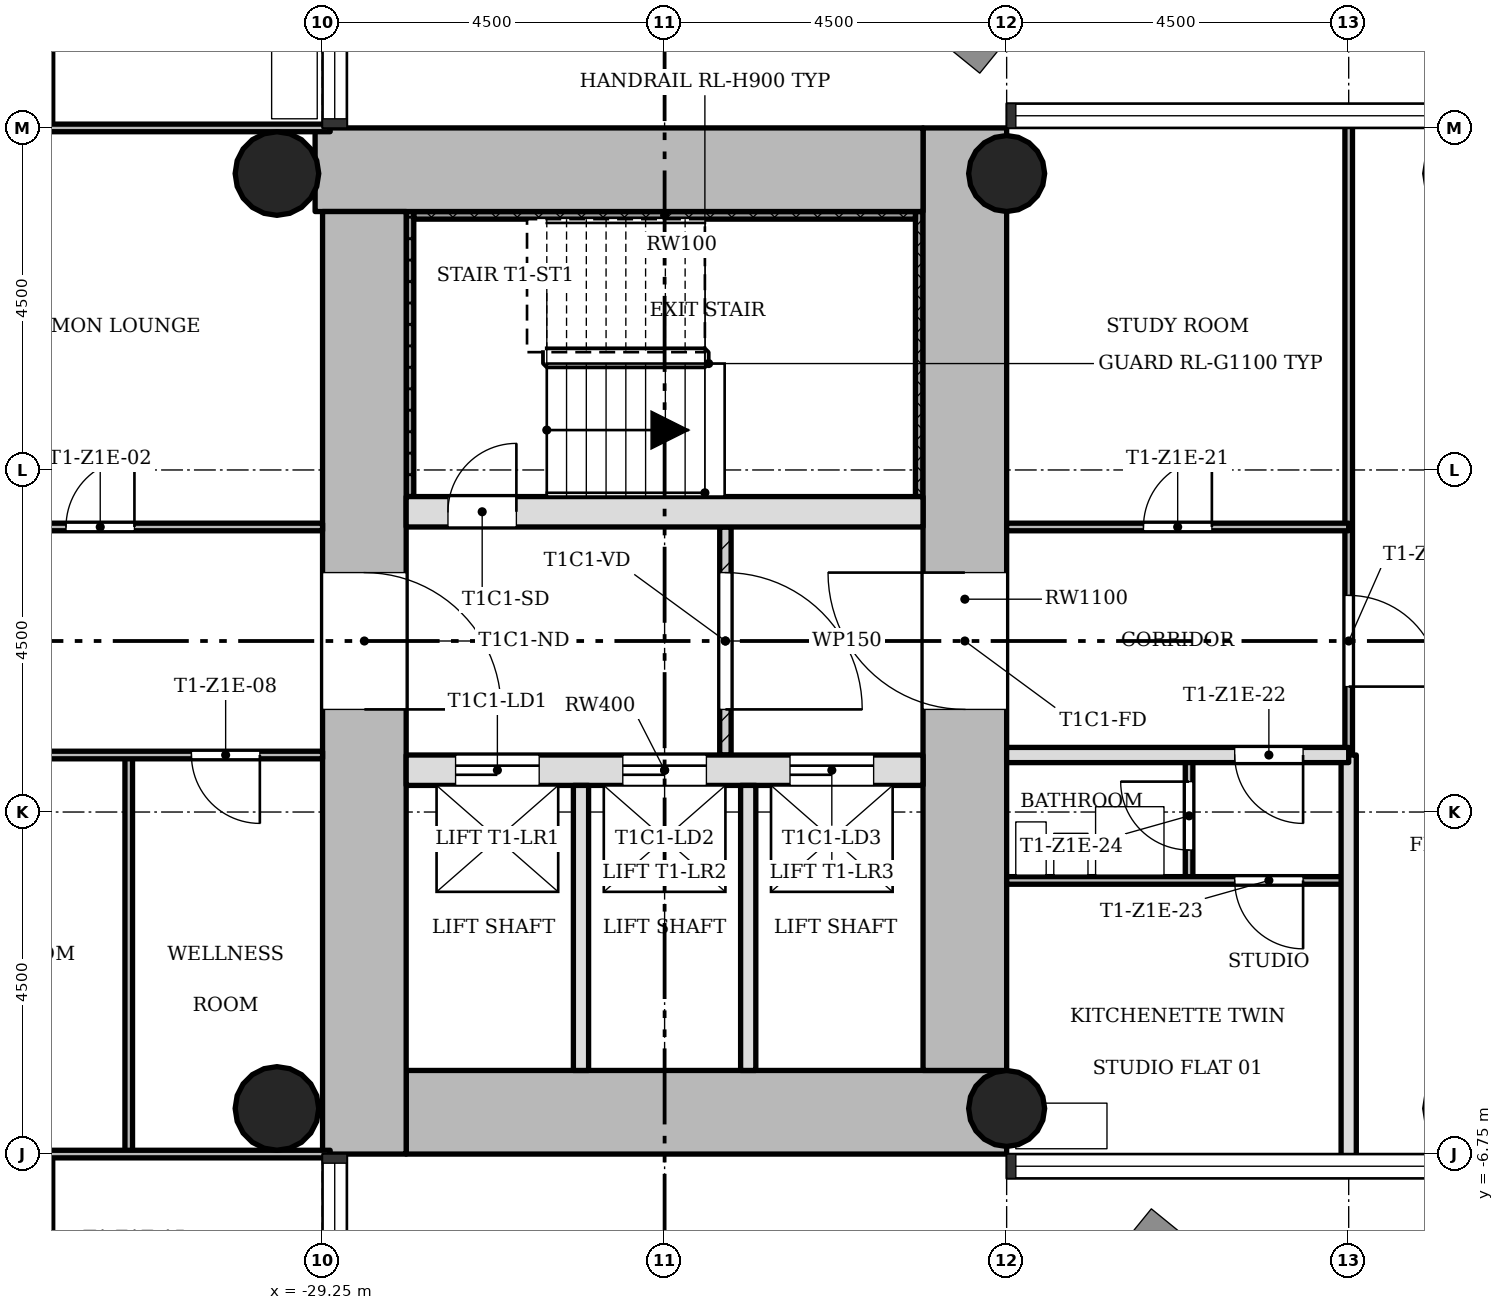
"""IFC4 building model, lengths in metres.
Left out: names, types, materials, properties, quantities, classifications, styles, units other than length and angle.
Written with IfcOpenShell. Run it as: python <this file> out.ifc"""

import sys

from ifc_helpers import new_model, si_unit, direction, frame, frame_2d, origin, origin_2d, place, context, subcontext, project, spatial, rectangle, hollow_circle, extrude, element, fill, save


model = new_model("IFC4")
c1 = context("Model", 3, precision=1e-05, world=origin(), true_north=direction((0.0, 1.0)))
c2 = subcontext(c1, "Body", "Model", "MODEL_VIEW")
j1 = project(units=[si_unit("LENGTHUNIT", "METRE"), si_unit("PLANEANGLEUNIT", "RADIAN")], contexts=[c1])
p1 = place(None, origin())
s1 = spatial("IfcSite", under=j1, at=p1, CompositionType="ELEMENT")
p2 = place(p1, origin())
s2 = spatial("IfcBuilding", under=s1, at=p2, CompositionType="ELEMENT")
p3 = place(p2, frame((0.0, 0.0, 65.3)))
s3 = spatial("IfcBuildingStorey", under=s2, at=p3, CompositionType="ELEMENT", Elevation=65.3)
p4 = place(p3, frame((-28.15, -6.2, 0.0), z_axis=(0.0, 0.0, 1.0), x_axis=(1.0, 0.0, 0.0)))
e1 = element("IfcWall", 1, at=p4, inside=s3, PredefinedType="SHEAR", context=c2, shape_type="SweptSolid", body=[
    extrude(rectangle(XDim=7.9, YDim=1.1, at=frame_2d((3.95, 0.0))), origin(), (0.0, 0.0, 1.0), 3.4),
])
p5 = place(p3, frame((-20.8, -5.65, 0.0), z_axis=(0.0, 0.0, 1.0), x_axis=(0.0, 1.0, 0.0)))
e2 = element("IfcWall", 2, at=p5, inside=s3, PredefinedType="SHEAR", context=c2, shape_type="SweptSolid", body=[
    extrude(rectangle(XDim=12.4, YDim=1.1, at=frame_2d((6.2, 0.0))), origin(), (0.0, 0.0, 1.0), 3.4),
])
p6 = place(p5, frame((4.75, 0.0, 0.0)))
e3 = element("IfcOpeningElement", 3, at=p6, cuts=e2, PredefinedType="OPENING", context=c2, shape_type="SweptSolid", body=[
    extrude(rectangle(XDim=1.8, YDim=2.1, at=frame_2d((0.9, 1.05))), frame((0.0, 0.56, 0.0), z_axis=(0.0, -1.0, 0.0), x_axis=(1.0, 0.0, 0.0)), (0.0, 0.0, 1.0), 1.12),
])
p7 = place(p3, frame((-21.35, 6.2, 0.0), z_axis=(0.0, 0.0, 1.0), x_axis=(-1.0, 0.0, 0.0)))
e4 = element("IfcWall", 4, at=p7, inside=s3, PredefinedType="SHEAR", context=c2, shape_type="SweptSolid", body=[
    extrude(rectangle(XDim=7.998, YDim=1.1, at=frame_2d((3.999, 0.0))), origin(), (0.0, 0.0, 1.0), 3.4),
])
p8 = place(p3, frame((-28.7, 5.65, 0.0), z_axis=(0.0, 0.0, 1.0), x_axis=(0.0, -1.0, 0.0)))
e5 = element("IfcWall", 5, at=p8, inside=s3, PredefinedType="SHEAR", context=c2, shape_type="SweptSolid", body=[
    extrude(rectangle(XDim=12.4, YDim=1.1, at=frame_2d((6.2, 0.0))), origin(), (0.0, 0.0, 1.0), 3.4),
])
p9 = place(p8, frame((4.75, 0.0, 0.0)))
e6 = element("IfcOpeningElement", 6, at=p9, cuts=e5, PredefinedType="OPENING", context=c2, shape_type="SweptSolid", body=[
    extrude(rectangle(XDim=1.8, YDim=2.1, at=frame_2d((0.9, 1.05))), frame((0.0, 0.56, 0.0), z_axis=(0.0, -1.0, 0.0), x_axis=(1.0, 0.0, 0.0)), (0.0, 0.0, 1.0), 1.12),
])
p10 = place(p3, frame((-28.15, -1.7, 0.0), z_axis=(0.0, 0.0, 1.0), x_axis=(1.0, 0.0, 0.0)))
e7 = element("IfcWall", 7, at=p10, inside=s3, PredefinedType="SHEAR", context=c2, shape_type="SweptSolid", body=[
    extrude(rectangle(XDim=6.8, YDim=0.4, at=frame_2d((3.4, 0.0))), origin(), (0.0, 0.0, 1.0), 3.4),
])
p11 = place(p10, frame((0.65, 0.0, 0.0)))
e8 = element("IfcOpeningElement", 8, at=p11, cuts=e7, PredefinedType="OPENING", context=c2, shape_type="SweptSolid", body=[
    extrude(rectangle(XDim=1.1, YDim=2.1, at=frame_2d((0.55, 1.05))), frame((0.0, 0.21, 0.0), z_axis=(0.0, -1.0, 0.0), x_axis=(1.0, 0.0, 0.0)), (0.0, 0.0, 1.0), 0.42),
])
p12 = place(p10, frame((2.85, 0.0, 0.0)))
e9 = element("IfcOpeningElement", 9, at=p12, cuts=e7, PredefinedType="OPENING", context=c2, shape_type="SweptSolid", body=[
    extrude(rectangle(XDim=1.1, YDim=2.1, at=frame_2d((0.55, 1.05))), frame((0.0, 0.21, 0.0), z_axis=(0.0, -1.0, 0.0), x_axis=(1.0, 0.0, 0.0)), (0.0, 0.0, 1.0), 0.42),
])
p13 = place(p10, frame((5.05, 0.0, 0.0)))
e10 = element("IfcOpeningElement", 10, at=p13, cuts=e7, PredefinedType="OPENING", context=c2, shape_type="SweptSolid", body=[
    extrude(rectangle(XDim=1.1, YDim=2.1, at=frame_2d((0.55, 1.05))), frame((0.0, 0.21, 0.0), z_axis=(0.0, -1.0, 0.0), x_axis=(1.0, 0.0, 0.0)), (0.0, 0.0, 1.0), 0.42),
])
p14 = place(p3, frame((-28.15, 1.7, 0.0), z_axis=(0.0, 0.0, 1.0), x_axis=(1.0, 0.0, 0.0)))
e11 = element("IfcWall", 11, at=p14, inside=s3, PredefinedType="SHEAR", context=c2, shape_type="SweptSolid", body=[
    extrude(rectangle(XDim=6.8, YDim=0.4, at=frame_2d((3.4, 0.0))), origin(), (0.0, 0.0, 1.0), 3.4),
])
p15 = place(p14, frame((0.55, 0.0, 0.0)))
e12 = element("IfcOpeningElement", 12, at=p15, cuts=e11, PredefinedType="OPENING", context=c2, shape_type="SweptSolid", body=[
    extrude(rectangle(XDim=0.9, YDim=2.1, at=frame_2d((0.45, 1.05))), frame((0.0, 0.21, 0.0), z_axis=(0.0, -1.0, 0.0), x_axis=(1.0, 0.0, 0.0)), (0.0, 0.0, 1.0), 0.42),
])
for number, where, z_axis, x_axis in (
    (13, (-20.25, -6.15, 0.0), (0.0, 0.0, 1.0), (1.0, 0.0, 0.0)),
    (14, (-20.25, 6.15, 0.0), (0.0, 0.0, 1.0), (1.0, 0.0, 0.0)),
):
    element("IfcColumn", number, at=place(p3, frame(where, z_axis=z_axis, x_axis=x_axis)), inside=s3, PredefinedType="COLUMN", context=c2, shape_type="SweptSolid", body=[
        extrude(hollow_circle(Radius=0.5, WallThickness=0.036, at=origin_2d()), origin(), (0.0, 0.0, 1.0), 3.4),
    ])
for number, where, z_axis, x_axis in (
    (15, (-29.85, -6.15, 0.0), (0.0, 0.0, 1.0), (1.0, 0.0, 0.0)),
    (16, (-29.85, 6.15, 0.0), (0.0, 0.0, 1.0), (1.0, 0.0, 0.0)),
):
    element("IfcColumn", number, at=place(p3, frame(where, z_axis=z_axis, x_axis=x_axis)), inside=s3, PredefinedType="COLUMN", context=c2, shape_type="SweptSolid", body=[
        extrude(hollow_circle(Radius=0.55, WallThickness=0.04, at=origin_2d()), origin(), (0.0, 0.0, 1.0), 3.4),
    ])
p16 = place(p3, frame((-23.95, -1.5, 0.0), z_axis=(0.0, 0.0, 1.0), x_axis=(0.0, 1.0, 0.0)))
e17 = element("IfcWall", 17, at=p16, inside=s3, PredefinedType="PARTITIONING", context=c2, shape_type="SweptSolid", body=[
    extrude(rectangle(XDim=3.0, YDim=0.15, at=frame_2d((1.5, 0.0))), origin(), (0.0, 0.0, 1.0), 3.0),
])
p17 = place(p16, frame((0.6, 0.0, 0.0)))
e18 = element("IfcOpeningElement", 18, at=p17, cuts=e17, PredefinedType="OPENING", context=c2, shape_type="SweptSolid", body=[
    extrude(rectangle(XDim=1.8, YDim=2.1, at=frame_2d((0.9, 1.05))), frame((0.0, 0.085, 0.0), z_axis=(0.0, -1.0, 0.0), x_axis=(1.0, 0.0, 0.0)), (0.0, 0.0, 1.0), 0.17),
])
for number, where, z_axis, x_axis in (
    (19, (-25.85, -5.65, 0.0), (0.0, 0.0, 1.0), (0.0, 1.0, 0.0)),
    (20, (-23.65, -5.65, 0.0), (0.0, 0.0, 1.0), (0.0, 1.0, 0.0)),
):
    element("IfcWall", number, at=place(p3, frame(where, z_axis=z_axis, x_axis=x_axis)), inside=s3, PredefinedType="SOLIDWALL", context=c2, shape_type="SweptSolid", body=[
        extrude(rectangle(XDim=3.75, YDim=0.2, at=frame_2d((1.875, 0.0))), origin(), (0.0, 0.0, 1.0), 3.0),
    ])
p18 = place(p3, frame((-31.8, -6.75, 0.0), z_axis=(0.0, 0.0, 1.0), x_axis=(0.0, 1.0, 0.0)))
e21 = element("IfcWall", 21, at=p18, inside=s3, PredefinedType="PARTITIONING", context=c2, shape_type="SweptSolid", body=[
    extrude(rectangle(XDim=5.25, YDim=0.1, at=frame_2d((2.625, 0.0))), origin(), (0.0, 0.0, 1.0), 3.0),
])
p19 = place(p3, frame((-17.85, -3.15, 0.0), z_axis=(0.0, 0.0, 1.0), x_axis=(0.0, 1.0, 0.0)))
e22 = element("IfcWall", 22, at=p19, inside=s3, PredefinedType="PARTITIONING", context=c2, shape_type="SweptSolid", body=[
    extrude(rectangle(XDim=1.65, YDim=0.1, at=frame_2d((0.825, 0.0))), origin(), (0.0, 0.0, 1.0), 3.0),
])
p20 = place(p19, frame((0.4, 0.0, 0.0)))
e23 = element("IfcOpeningElement", 23, at=p20, cuts=e22, PredefinedType="OPENING", context=c2, shape_type="SweptSolid", body=[
    extrude(rectangle(XDim=0.9, YDim=2.1, at=frame_2d((0.45, 1.05))), frame((0.0, 0.06, 0.0), z_axis=(0.0, -1.0, 0.0), x_axis=(1.0, 0.0, 0.0)), (0.0, 0.0, 1.0), 0.12),
])
p21 = place(p3, frame((-15.75, -1.5, 0.0), z_axis=(0.0, 0.0, 1.0), x_axis=(0.0, 1.0, 0.0)))
e24 = element("IfcWall", 24, at=p21, inside=s3, PredefinedType="PARTITIONING", context=c2, shape_type="SweptSolid", body=[
    extrude(rectangle(XDim=8.35, YDim=0.1, at=frame_2d((4.175, 0.0))), origin(), (0.0, 0.0, 1.0), 3.0),
])
p22 = place(p21, frame((0.9, 0.0, 0.0)))
e25 = element("IfcOpeningElement", 25, at=p22, cuts=e24, PredefinedType="OPENING", context=c2, shape_type="SweptSolid", body=[
    extrude(rectangle(XDim=1.2, YDim=2.1, at=frame_2d((0.6, 1.05))), frame((0.0, 0.06, 0.0), z_axis=(0.0, -1.0, 0.0), x_axis=(1.0, 0.0, 0.0)), (0.0, 0.0, 1.0), 0.12),
])
p23 = place(p3, frame((-15.75, -6.85, 0.0), z_axis=(0.0, 0.0, 1.0), x_axis=(0.0, 1.0, 0.0)))
e26 = element("IfcWall", 26, at=p23, inside=s3, PredefinedType="SOLIDWALL", context=c2, shape_type="SweptSolid", body=[
    extrude(rectangle(XDim=5.35, YDim=0.2, at=frame_2d((2.675, 0.0))), origin(), (0.0, 0.0, 1.0), 3.0),
])
p24 = place(p3, frame((-35.1, -6.75, 0.0), z_axis=(0.0, 0.0, 1.0), x_axis=(1.0, 0.0, 0.0)))
e27 = element("IfcWall", 27, at=p24, inside=s3, PredefinedType="PARTITIONING", context=c2, shape_type="SweptSolid", body=[
    extrude(rectangle(XDim=5.95, YDim=0.1, at=frame_2d((2.975, 0.0))), origin(), (0.0, 0.0, 1.0), 3.0),
])
p25 = place(p3, frame((-20.25, -3.15, 0.0), z_axis=(0.0, 0.0, 1.0), x_axis=(1.0, 0.0, 0.0)))
e28 = element("IfcWall", 28, at=p25, inside=s3, PredefinedType="PARTITIONING", context=c2, shape_type="SweptSolid", body=[
    extrude(rectangle(XDim=4.5, YDim=0.1, at=frame_2d((2.25, 0.0))), origin(), (0.0, 0.0, 1.0), 3.0),
])
p26 = place(p25, frame((3.0, 0.0, 0.0)))
e29 = element("IfcOpeningElement", 29, at=p26, cuts=e28, PredefinedType="OPENING", context=c2, shape_type="SweptSolid", body=[
    extrude(rectangle(XDim=0.9, YDim=2.1, at=frame_2d((0.45, 1.05))), frame((0.0, 0.06, 0.0), z_axis=(0.0, -1.0, 0.0), x_axis=(1.0, 0.0, 0.0)), (0.0, 0.0, 1.0), 0.12),
])
p27 = place(p3, frame((-35.1, -1.5, 0.0), z_axis=(0.0, 0.0, 1.0), x_axis=(1.0, 0.0, 0.0)))
e30 = element("IfcWall", 30, at=p27, inside=s3, PredefinedType="PARTITIONING", context=c2, shape_type="SweptSolid", body=[
    extrude(rectangle(XDim=5.85, YDim=0.1, at=frame_2d((2.925, 0.0))), origin(), (0.0, 0.0, 1.0), 3.0),
])
p28 = place(p27, frame((4.125, 0.0, 0.0)))
e31 = element("IfcOpeningElement", 31, at=p28, cuts=e30, PredefinedType="OPENING", context=c2, shape_type="SweptSolid", body=[
    extrude(rectangle(XDim=0.9, YDim=2.1, at=frame_2d((0.45, 1.05))), frame((0.0, 0.06, 0.0), z_axis=(0.0, -1.0, 0.0), x_axis=(1.0, 0.0, 0.0)), (0.0, 0.0, 1.0), 0.12),
])
p29 = place(p3, frame((-20.25, -1.5, 0.0), z_axis=(0.0, 0.0, 1.0), x_axis=(1.0, 0.0, 0.0)))
e32 = element("IfcWall", 32, at=p29, inside=s3, PredefinedType="SOLIDWALL", context=c2, shape_type="SweptSolid", body=[
    extrude(rectangle(XDim=4.5, YDim=0.2, at=frame_2d((2.25, 0.0))), origin(), (0.0, 0.0, 1.0), 3.0),
])
p30 = place(p29, frame((3.0, 0.0, 0.0)))
e33 = element("IfcOpeningElement", 33, at=p30, cuts=e32, PredefinedType="OPENING", context=c2, shape_type="SweptSolid", body=[
    extrude(rectangle(XDim=0.9, YDim=2.1, at=frame_2d((0.45, 1.05))), frame((0.0, 0.11, 0.0), z_axis=(0.0, -1.0, 0.0), x_axis=(1.0, 0.0, 0.0)), (0.0, 0.0, 1.0), 0.22),
])
p31 = place(p3, frame((-35.1, 1.5, 0.0), z_axis=(0.0, 0.0, 1.0), x_axis=(1.0, 0.0, 0.0)))
e34 = element("IfcWall", 34, at=p31, inside=s3, PredefinedType="PARTITIONING", context=c2, shape_type="SweptSolid", body=[
    extrude(rectangle(XDim=5.85, YDim=0.1, at=frame_2d((2.925, 0.0))), origin(), (0.0, 0.0, 1.0), 3.0),
])
p32 = place(p31, frame((2.475, 0.0, 0.0)))
e35 = element("IfcOpeningElement", 35, at=p32, cuts=e34, PredefinedType="OPENING", context=c2, shape_type="SweptSolid", body=[
    extrude(rectangle(XDim=0.9, YDim=2.1, at=frame_2d((0.45, 1.05))), frame((0.0, 0.06, 0.0), z_axis=(0.0, -1.0, 0.0), x_axis=(1.0, 0.0, 0.0)), (0.0, 0.0, 1.0), 0.12),
])
p33 = place(p3, frame((-20.25, 1.5, 0.0), z_axis=(0.0, 0.0, 1.0), x_axis=(1.0, 0.0, 0.0)))
e36 = element("IfcWall", 36, at=p33, inside=s3, PredefinedType="PARTITIONING", context=c2, shape_type="SweptSolid", body=[
    extrude(rectangle(XDim=4.5, YDim=0.1, at=frame_2d((2.25, 0.0))), origin(), (0.0, 0.0, 1.0), 3.0),
])
p34 = place(p33, frame((1.8, 0.0, 0.0)))
e37 = element("IfcOpeningElement", 37, at=p34, cuts=e36, PredefinedType="OPENING", context=c2, shape_type="SweptSolid", body=[
    extrude(rectangle(XDim=0.9, YDim=2.1, at=frame_2d((0.45, 1.05))), frame((0.0, 0.06, 0.0), z_axis=(0.0, -1.0, 0.0), x_axis=(1.0, 0.0, 0.0)), (0.0, 0.0, 1.0), 0.12),
])
p35 = place(p3, frame((-35.1, 6.75, 0.0), z_axis=(0.0, 0.0, 1.0), x_axis=(1.0, 0.0, 0.0)))
e38 = element("IfcWall", 38, at=p35, inside=s3, PredefinedType="PARTITIONING", context=c2, shape_type="SweptSolid", body=[
    extrude(rectangle(XDim=5.95, YDim=0.1, at=frame_2d((2.975, 0.0))), origin(), (0.0, 0.0, 1.0), 3.0),
])
p36 = place(p3, frame((-21.4, 1.9, 0.0), z_axis=(0.0, 0.0, 1.0), x_axis=(0.0, 1.0, 0.0)))
e39 = element("IfcWall", 39, at=p36, inside=s3, PredefinedType="SHEAR", context=c2, shape_type="SweptSolid", body=[
    extrude(rectangle(XDim=3.75, YDim=0.1, at=frame_2d((1.875, 0.0))), origin(), (0.0, 0.0, 1.0), 3.4),
])
p37 = place(p3, frame((-28.05, 5.6, 0.0), z_axis=(0.0, 0.0, 1.0), x_axis=(1.0, 0.0, 0.0)))
e40 = element("IfcWall", 40, at=p37, inside=s3, PredefinedType="SHEAR", context=c2, shape_type="SweptSolid", body=[
    extrude(rectangle(XDim=6.6, YDim=0.1, at=frame_2d((3.3, 0.0))), origin(), (0.0, 0.0, 1.0), 3.4),
])
p38 = place(p3, frame((-28.1, 1.9, 0.0), z_axis=(0.0, 0.0, 1.0), x_axis=(0.0, 1.0, 0.0)))
e41 = element("IfcWall", 41, at=p38, inside=s3, PredefinedType="SHEAR", context=c2, shape_type="SweptSolid", body=[
    extrude(rectangle(XDim=3.75, YDim=0.1, at=frame_2d((1.875, 0.0))), origin(), (0.0, 0.0, 1.0), 3.4),
])
p39 = place(p17, origin())
e42 = element("IfcDoor", 42, at=p39, inside=s3, OperationType="SINGLE_SWING_LEFT", PredefinedType="DOOR", context=c2, shape_type="SweptSolid", body=[
    extrude(rectangle(XDim=1.8, YDim=2.1, at=frame_2d((0.9, 1.05))), frame((0.0, 0.025, 0.0), z_axis=(0.0, -1.0, 0.0), x_axis=(1.0, 0.0, 0.0)), (0.0, 0.0, 1.0), 0.05),
])
fill(e18, e42)
p40 = place(p32, origin())
e43 = element("IfcDoor", 43, at=p40, inside=s3, OperationType="SINGLE_SWING_LEFT", PredefinedType="DOOR", context=c2, shape_type="SweptSolid", body=[
    extrude(rectangle(XDim=0.9, YDim=2.1, at=frame_2d((0.45, 1.05))), frame((0.0, 0.025, 0.0), z_axis=(0.0, -1.0, 0.0), x_axis=(1.0, 0.0, 0.0)), (0.0, 0.0, 1.0), 0.05),
])
fill(e35, e43)
p41 = place(p28, origin())
e44 = element("IfcDoor", 44, at=p41, inside=s3, OperationType="SINGLE_SWING_RIGHT", PredefinedType="DOOR", context=c2, shape_type="SweptSolid", body=[
    extrude(rectangle(XDim=0.9, YDim=2.1, at=frame_2d((0.45, 1.05))), frame((0.0, 0.025, 0.0), z_axis=(0.0, -1.0, 0.0), x_axis=(1.0, 0.0, 0.0)), (0.0, 0.0, 1.0), 0.05),
])
fill(e31, e44)
p42 = place(p34, origin())
e45 = element("IfcDoor", 45, at=p42, inside=s3, OperationType="SINGLE_SWING_LEFT", PredefinedType="DOOR", context=c2, shape_type="SweptSolid", body=[
    extrude(rectangle(XDim=0.9, YDim=2.1, at=frame_2d((0.45, 1.05))), frame((0.0, 0.025, 0.0), z_axis=(0.0, -1.0, 0.0), x_axis=(1.0, 0.0, 0.0)), (0.0, 0.0, 1.0), 0.05),
])
fill(e37, e45)
p43 = place(p30, origin())
e46 = element("IfcDoor", 46, at=p43, inside=s3, OperationType="SINGLE_SWING_RIGHT", PredefinedType="DOOR", context=c2, shape_type="SweptSolid", body=[
    extrude(rectangle(XDim=0.9, YDim=2.1, at=frame_2d((0.45, 1.05))), frame((0.0, 0.025, 0.0), z_axis=(0.0, -1.0, 0.0), x_axis=(1.0, 0.0, 0.0)), (0.0, 0.0, 1.0), 0.05),
])
fill(e33, e46)
p44 = place(p26, origin())
e47 = element("IfcDoor", 47, at=p44, inside=s3, OperationType="SINGLE_SWING_RIGHT", PredefinedType="DOOR", context=c2, shape_type="SweptSolid", body=[
    extrude(rectangle(XDim=0.9, YDim=2.1, at=frame_2d((0.45, 1.05))), frame((0.0, 0.025, 0.0), z_axis=(0.0, -1.0, 0.0), x_axis=(1.0, 0.0, 0.0)), (0.0, 0.0, 1.0), 0.05),
])
fill(e29, e47)
p45 = place(p20, origin())
e48 = element("IfcDoor", 48, at=p45, inside=s3, OperationType="SINGLE_SWING_LEFT", PredefinedType="DOOR", context=c2, shape_type="SweptSolid", body=[
    extrude(rectangle(XDim=0.9, YDim=2.1, at=frame_2d((0.45, 1.05))), frame((0.0, 0.025, 0.0), z_axis=(0.0, -1.0, 0.0), x_axis=(1.0, 0.0, 0.0)), (0.0, 0.0, 1.0), 0.05),
])
fill(e23, e48)
p46 = place(p22, origin())
e49 = element("IfcDoor", 49, at=p46, inside=s3, OperationType="SINGLE_SWING_LEFT", PredefinedType="DOOR", context=c2, shape_type="SweptSolid", body=[
    extrude(rectangle(XDim=1.2, YDim=2.1, at=frame_2d((0.6, 1.05))), frame((0.0, 0.025, 0.0), z_axis=(0.0, -1.0, 0.0), x_axis=(1.0, 0.0, 0.0)), (0.0, 0.0, 1.0), 0.05),
])
fill(e25, e49)
p47 = place(p15, origin())
e50 = element("IfcDoor", 50, at=p47, inside=s3, OperationType="SINGLE_SWING_LEFT", PredefinedType="DOOR", context=c2, shape_type="SweptSolid", body=[
    extrude(rectangle(XDim=0.9, YDim=2.1, at=frame_2d((0.45, 1.05))), frame((0.0, 0.025, 0.0), z_axis=(0.0, -1.0, 0.0), x_axis=(1.0, 0.0, 0.0)), (0.0, 0.0, 1.0), 0.05),
])
fill(e12, e50)
p48 = place(p11, origin())
e51 = element("IfcDoor", 51, at=p48, inside=s3, OperationType="SLIDING_TO_LEFT", PredefinedType="DOOR", context=c2, shape_type="SweptSolid", body=[
    extrude(rectangle(XDim=1.1, YDim=2.1, at=frame_2d((0.55, 1.05))), frame((0.0, 0.025, 0.0), z_axis=(0.0, -1.0, 0.0), x_axis=(1.0, 0.0, 0.0)), (0.0, 0.0, 1.0), 0.05),
])
fill(e8, e51)
p49 = place(p12, origin())
e52 = element("IfcDoor", 52, at=p49, inside=s3, OperationType="SLIDING_TO_LEFT", PredefinedType="DOOR", context=c2, shape_type="SweptSolid", body=[
    extrude(rectangle(XDim=1.1, YDim=2.1, at=frame_2d((0.55, 1.05))), frame((0.0, 0.025, 0.0), z_axis=(0.0, -1.0, 0.0), x_axis=(1.0, 0.0, 0.0)), (0.0, 0.0, 1.0), 0.05),
])
fill(e9, e52)
p50 = place(p13, origin())
e53 = element("IfcDoor", 53, at=p50, inside=s3, OperationType="SLIDING_TO_LEFT", PredefinedType="DOOR", context=c2, shape_type="SweptSolid", body=[
    extrude(rectangle(XDim=1.1, YDim=2.1, at=frame_2d((0.55, 1.05))), frame((0.0, 0.025, 0.0), z_axis=(0.0, -1.0, 0.0), x_axis=(1.0, 0.0, 0.0)), (0.0, 0.0, 1.0), 0.05),
])
fill(e10, e53)
p51 = place(p9, origin())
e54 = element("IfcDoor", 54, at=p51, inside=s3, OperationType="SINGLE_SWING_LEFT", PredefinedType="DOOR", context=c2, shape_type="SweptSolid", body=[
    extrude(rectangle(XDim=1.8, YDim=2.1, at=frame_2d((0.9, 1.05))), frame((0.0, 0.025, 0.0), z_axis=(0.0, -1.0, 0.0), x_axis=(1.0, 0.0, 0.0)), (0.0, 0.0, 1.0), 0.05),
])
fill(e6, e54)
p52 = place(p6, origin())
e55 = element("IfcDoor", 55, at=p52, inside=s3, OperationType="SINGLE_SWING_LEFT", PredefinedType="DOOR", context=c2, shape_type="SweptSolid", body=[
    extrude(rectangle(XDim=1.8, YDim=2.1, at=frame_2d((0.9, 1.05))), frame((0.0, 0.025, 0.0), z_axis=(0.0, -1.0, 0.0), x_axis=(1.0, 0.0, 0.0)), (0.0, 0.0, 1.0), 0.05),
])
fill(e3, e55)
save(model, sys.argv[1])
